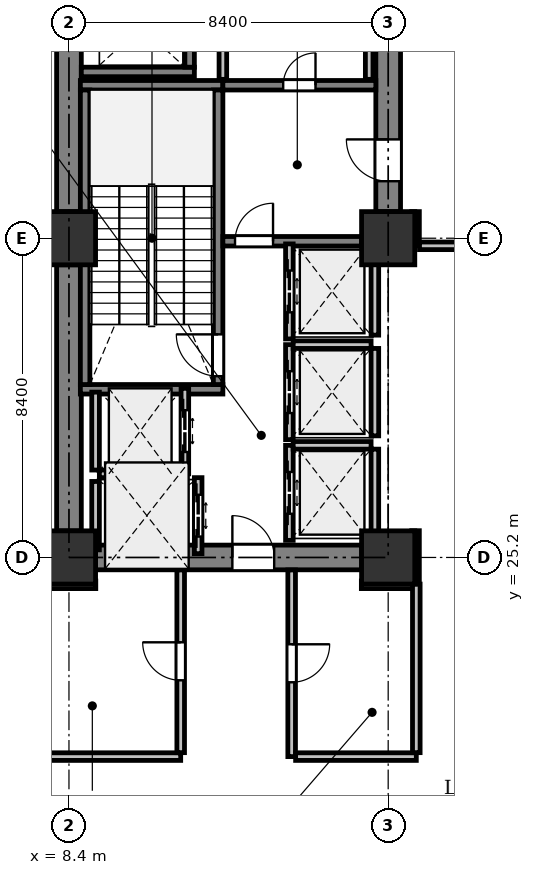
"""IFC4 building model, lengths in metres.
Left out: names, types, materials, properties, quantities, classifications, styles, units other than length and angle.
Written with IfcOpenShell. Run it as: python <this file> out.ifc"""

import sys

from ifc_helpers import new_model, si_unit, direction, frame, frame_2d, origin, origin_2d, place, context, subcontext, project, spatial, rectangle, extrude, element, fill, save


model = new_model("IFC4")
c1 = context("Model", 3, precision=1e-05, world=origin(), true_north=direction((0.0, 1.0)))
c2 = subcontext(c1, "Body", "Model", "MODEL_VIEW")
j1 = project(units=[si_unit("LENGTHUNIT", "METRE"), si_unit("PLANEANGLEUNIT", "RADIAN")], contexts=[c1])
p1 = place(None, origin())
s1 = spatial("IfcSite", under=j1, at=p1, CompositionType="ELEMENT")
p2 = place(p1, origin())
s2 = spatial("IfcBuilding", under=s1, at=p2, CompositionType="ELEMENT")
p3 = place(p2, frame((0.0, 0.0, 79.4)))
s3 = spatial("IfcBuildingStorey", under=s2, at=p3, CompositionType="ELEMENT", Elevation=79.4)
for number, where, z_axis, x_axis in (
    (1, (8.4, 25.2, 0.0), (0.0, 0.0, 1.0), (1.0, 0.0, 0.0)),
    (2, (8.4, 33.6, 0.0), (0.0, 0.0, 1.0), (1.0, 0.0, 0.0)),
    (3, (16.8, 25.2, 0.0), (0.0, 0.0, 1.0), (1.0, 0.0, 0.0)),
    (4, (16.8, 33.6, 0.0), (0.0, 0.0, 1.0), (1.0, 0.0, 0.0)),
):
    element("IfcColumn", number, at=place(p3, frame(where, z_axis=z_axis, x_axis=x_axis)), inside=s3, PredefinedType="COLUMN", context=c2, shape_type="SweptSolid", body=[
        extrude(rectangle(XDim=1.4, YDim=1.4, at=origin_2d()), origin(), (0.0, 0.0, 1.0), 5.0),
    ])
for number, where, z_axis, x_axis in (
    (5, (8.4, 25.9, 0.0), (0.0, 0.0, 1.0), (0.0, 1.0, 0.0)),
    (6, (8.4, 34.3, 0.0), (0.0, 0.0, 1.0), (0.0, 1.0, 0.0)),
):
    element("IfcWall", number, at=place(p3, frame(where, z_axis=z_axis, x_axis=x_axis)), inside=s3, PredefinedType="SHEAR", context=c2, shape_type="SweptSolid", body=[
        extrude(rectangle(XDim=7.0, YDim=0.65, at=frame_2d((3.5, 0.0))), origin(), (0.0, 0.0, 1.0), 4.725),
    ])
p4 = place(p3, frame((16.8, 34.3, 0.0), z_axis=(0.0, 0.0, 1.0), x_axis=(0.0, 1.0, 0.0)))
e7 = element("IfcWall", 7, at=p4, inside=s3, PredefinedType="SHEAR", context=c2, shape_type="SweptSolid", body=[
    extrude(rectangle(XDim=7.0, YDim=0.65, at=frame_2d((3.5, 0.0))), origin(), (0.0, 0.0, 1.0), 4.725),
])
p5 = place(p4, frame((0.8, 0.0, 0.0)))
e8 = element("IfcOpeningElement", 8, at=p5, cuts=e7, PredefinedType="OPENING", context=c2, shape_type="SweptSolid", body=[
    extrude(rectangle(XDim=1.1, YDim=2.15, at=frame_2d((0.55, 1.075))), frame((0.0, 0.335, 0.0), z_axis=(0.0, -1.0, 0.0), x_axis=(1.0, 0.0, 0.0)), (0.0, 0.0, 1.0), 0.67),
])
p6 = place(p3, frame((9.1, 25.2, 0.0), z_axis=(0.0, 0.0, 1.0), x_axis=(1.0, 0.0, 0.0)))
e9 = element("IfcWall", 9, at=p6, inside=s3, PredefinedType="SHEAR", context=c2, shape_type="SweptSolid", body=[
    extrude(rectangle(XDim=7.0, YDim=0.65, at=frame_2d((3.5, 0.0))), origin(), (0.0, 0.0, 1.0), 4.725),
])
p7 = place(p6, frame((3.6, 0.0, 0.0)))
e10 = element("IfcOpeningElement", 10, at=p7, cuts=e9, PredefinedType="OPENING", context=c2, shape_type="SweptSolid", body=[
    extrude(rectangle(XDim=1.1, YDim=2.15, at=frame_2d((0.55, 1.075))), frame((0.0, 0.335, 0.0), z_axis=(0.0, -1.0, 0.0), x_axis=(1.0, 0.0, 0.0)), (0.0, 0.0, 1.0), 0.67),
])
for number, where, z_axis, x_axis in (
    (11, (12.45, 29.625, 0.0), (0.0, 0.0, 1.0), (-1.0, 0.0, 0.0)),
    (12, (12.45, 37.625, 0.0), (0.0, 0.0, 1.0), (-1.0, 0.0, 0.0)),
):
    element("IfcWall", number, at=place(p3, frame(where, z_axis=z_axis, x_axis=x_axis)), inside=s3, PredefinedType="SHEAR", context=c2, shape_type="SweptSolid", body=[
        extrude(rectangle(XDim=3.75, YDim=0.25, at=frame_2d((1.875, 0.0))), origin(), (0.0, 0.0, 1.0), 4.725),
    ])
p8 = place(p3, frame((12.325, 29.75, 0.0), z_axis=(0.0, 0.0, 1.0), x_axis=(0.0, 1.0, 0.0)))
e13 = element("IfcWall", 13, at=p8, inside=s3, PredefinedType="SHEAR", context=c2, shape_type="SweptSolid", body=[
    extrude(rectangle(XDim=7.75, YDim=0.25, at=frame_2d((3.875, 0.0))), origin(), (0.0, 0.0, 1.0), 4.725),
])
p9 = place(p8, frame((0.22, 0.0, 0.0)))
e14 = element("IfcOpeningElement", 14, at=p9, cuts=e13, PredefinedType="OPENING", context=c2, shape_type="SweptSolid", body=[
    extrude(rectangle(XDim=1.1, YDim=2.15, at=frame_2d((0.55, 1.075))), frame((0.0, 0.135, 0.0), z_axis=(0.0, -1.0, 0.0), x_axis=(1.0, 0.0, 0.0)), (0.0, 0.0, 1.0), 0.27),
])
p10 = place(p3, frame((8.825, 29.75, 0.0), z_axis=(0.0, 0.0, 1.0), x_axis=(0.0, 1.0, 0.0)))
e15 = element("IfcWall", 15, at=p10, inside=s3, PredefinedType="SHEAR", context=c2, shape_type="SweptSolid", body=[
    extrude(rectangle(XDim=7.75, YDim=0.25, at=frame_2d((3.875, 0.0))), origin(), (0.0, 0.0, 1.0), 4.725),
])
p11 = place(p3, frame((8.725, 37.975, 0.0), z_axis=(0.0, 0.0, 1.0), x_axis=(1.0, 0.0, 0.0)))
e16 = element("IfcWall", 16, at=p11, inside=s3, PredefinedType="SHEAR", context=c2, shape_type="SweptSolid", body=[
    extrude(rectangle(XDim=2.975, YDim=0.25, at=frame_2d((1.487, 0.0))), origin(), (0.0, 0.0, 1.0), 4.725),
])
p12 = place(p3, frame((11.575, 38.1, 0.0), z_axis=(0.0, 0.0, 1.0), x_axis=(0.0, 1.0, 0.0)))
e17 = element("IfcWall", 17, at=p12, inside=s3, PredefinedType="SHEAR", context=c2, shape_type="SweptSolid", body=[
    extrude(rectangle(XDim=2.45, YDim=0.25, at=frame_2d((1.225, 0.0))), origin(), (0.0, 0.0, 1.0), 4.725),
])
p13 = place(p3, frame((12.45, 33.52, 0.0), z_axis=(0.0, 0.0, 1.0), x_axis=(1.0, 0.0, 0.0)))
e18 = element("IfcWall", 18, at=p13, inside=s3, PredefinedType="SHEAR", context=c2, shape_type="SweptSolid", body=[
    extrude(rectangle(XDim=3.65, YDim=0.25, at=frame_2d((1.825, 0.0))), origin(), (0.0, 0.0, 1.0), 4.725),
])
p14 = place(p13, frame((0.32, 0.0, 0.0)))
e19 = element("IfcOpeningElement", 19, at=p14, cuts=e18, PredefinedType="OPENING", context=c2, shape_type="SweptSolid", body=[
    extrude(rectangle(XDim=1.0, YDim=2.15, at=frame_2d((0.5, 1.075))), frame((0.0, 0.135, 0.0), z_axis=(0.0, -1.0, 0.0), x_axis=(1.0, 0.0, 0.0)), (0.0, 0.0, 1.0), 0.27),
])
p15 = place(p3, frame((12.45, 37.625, 0.0), z_axis=(0.0, 0.0, 1.0), x_axis=(1.0, 0.0, 0.0)))
e20 = element("IfcWall", 20, at=p15, inside=s3, PredefinedType="SHEAR", context=c2, shape_type="SweptSolid", body=[
    extrude(rectangle(XDim=4.025, YDim=0.25, at=frame_2d((2.013, 0.0))), origin(), (0.0, 0.0, 1.0), 4.725),
])
p16 = place(p15, frame((1.587, 0.0, 0.0)))
e21 = element("IfcOpeningElement", 21, at=p16, cuts=e20, PredefinedType="OPENING", context=c2, shape_type="SweptSolid", body=[
    extrude(rectangle(XDim=0.85, YDim=2.15, at=frame_2d((0.425, 1.075))), frame((0.0, 0.135, 0.0), z_axis=(0.0, -1.0, 0.0), x_axis=(1.0, 0.0, 0.0)), (0.0, 0.0, 1.0), 0.27),
])
p17 = place(p3, frame((11.45, 27.4, 0.0), z_axis=(0.0, 0.0, 1.0), x_axis=(0.0, 1.0, 0.0)))
e22 = element("IfcWall", 22, at=p17, inside=s3, PredefinedType="PARTITIONING", context=c2, shape_type="SweptSolid", body=[
    extrude(rectangle(XDim=2.25, YDim=0.2, at=frame_2d((1.125, 0.0))), origin(), (0.0, 0.0, 1.0), 4.725),
])
p18 = place(p17, frame((0.575, 0.0, 0.0)))
e23 = element("IfcOpeningElement", 23, at=p18, cuts=e22, PredefinedType="OPENING", context=c2, shape_type="SweptSolid", body=[
    extrude(rectangle(XDim=1.1, YDim=2.2, at=frame_2d((0.55, 1.1))), frame((0.0, 0.11, 0.0), z_axis=(0.0, -1.0, 0.0), x_axis=(1.0, 0.0, 0.0)), (0.0, 0.0, 1.0), 0.22),
])
p19 = place(p3, frame((9.1, 27.5, 0.0), z_axis=(0.0, 0.0, 1.0), x_axis=(0.0, 1.0, 0.0)))
e24 = element("IfcWall", 24, at=p19, inside=s3, PredefinedType="PARTITIONING", context=c2, shape_type="SweptSolid", body=[
    extrude(rectangle(XDim=2.05, YDim=0.2, at=frame_2d((1.025, 0.0))), origin(), (0.0, 0.0, 1.0), 4.725),
])
p20 = place(p3, frame((9.2, 27.4, 0.0), z_axis=(0.0, 0.0, 1.0), x_axis=(1.0, 0.0, 0.0)))
e25 = element("IfcWall", 25, at=p20, inside=s3, PredefinedType="PARTITIONING", context=c2, shape_type="SweptSolid", body=[
    extrude(rectangle(XDim=2.15, YDim=0.2, at=frame_2d((1.075, 0.0))), origin(), (0.0, 0.0, 1.0), 4.725),
])
p21 = place(p3, frame((11.8, 25.3, 0.0), z_axis=(0.0, 0.0, 1.0), x_axis=(0.0, 1.0, 0.0)))
e26 = element("IfcWall", 26, at=p21, inside=s3, PredefinedType="PARTITIONING", context=c2, shape_type="SweptSolid", body=[
    extrude(rectangle(XDim=2.0, YDim=0.2, at=frame_2d((1.0, 0.0))), origin(), (0.0, 0.0, 1.0), 4.725),
])
p22 = place(p21, frame((0.45, 0.0, 0.0)))
e27 = element("IfcOpeningElement", 27, at=p22, cuts=e26, PredefinedType="OPENING", context=c2, shape_type="SweptSolid", body=[
    extrude(rectangle(XDim=1.1, YDim=2.2, at=frame_2d((0.55, 1.1))), frame((0.0, 0.11, 0.0), z_axis=(0.0, -1.0, 0.0), x_axis=(1.0, 0.0, 0.0)), (0.0, 0.0, 1.0), 0.22),
])
p23 = place(p3, frame((9.1, 25.4, 0.0), z_axis=(0.0, 0.0, 1.0), x_axis=(0.0, 1.0, 0.0)))
e28 = element("IfcWall", 28, at=p23, inside=s3, PredefinedType="PARTITIONING", context=c2, shape_type="SweptSolid", body=[
    extrude(rectangle(XDim=1.8, YDim=0.2, at=frame_2d((0.9, 0.0))), origin(), (0.0, 0.0, 1.0), 4.725),
])
p24 = place(p3, frame((14.2, 25.65, 0.0), z_axis=(0.0, 0.0, 1.0), x_axis=(0.0, 1.0, 0.0)))
e29 = element("IfcWall", 29, at=p24, inside=s3, PredefinedType="PARTITIONING", context=c2, shape_type="SweptSolid", body=[
    extrude(rectangle(XDim=2.5, YDim=0.2, at=frame_2d((1.25, 0.0))), origin(), (0.0, 0.0, 1.0), 4.725),
])
p25 = place(p24, frame((0.7, 0.0, 0.0)))
e30 = element("IfcOpeningElement", 30, at=p25, cuts=e29, PredefinedType="OPENING", context=c2, shape_type="SweptSolid", body=[
    extrude(rectangle(XDim=1.1, YDim=2.2, at=frame_2d((0.55, 1.1))), frame((0.0, 0.11, 0.0), z_axis=(0.0, -1.0, 0.0), x_axis=(1.0, 0.0, 0.0)), (0.0, 0.0, 1.0), 0.22),
])
p26 = place(p3, frame((16.45, 25.75, 0.0), z_axis=(0.0, 0.0, 1.0), x_axis=(0.0, 1.0, 0.0)))
e31 = element("IfcWall", 31, at=p26, inside=s3, PredefinedType="PARTITIONING", context=c2, shape_type="SweptSolid", body=[
    extrude(rectangle(XDim=2.3, YDim=0.2, at=frame_2d((1.15, 0.0))), origin(), (0.0, 0.0, 1.0), 4.725),
])
p27 = place(p3, frame((14.3, 28.15, 0.0), z_axis=(0.0, 0.0, 1.0), x_axis=(1.0, 0.0, 0.0)))
e32 = element("IfcWall", 32, at=p27, inside=s3, PredefinedType="PARTITIONING", context=c2, shape_type="SweptSolid", body=[
    extrude(rectangle(XDim=2.05, YDim=0.2, at=frame_2d((1.025, 0.0))), origin(), (0.0, 0.0, 1.0), 4.725),
])
p28 = place(p3, frame((14.2, 28.3, 0.0), z_axis=(0.0, 0.0, 1.0), x_axis=(0.0, 1.0, 0.0)))
e33 = element("IfcWall", 33, at=p28, inside=s3, PredefinedType="PARTITIONING", context=c2, shape_type="SweptSolid", body=[
    extrude(rectangle(XDim=2.5, YDim=0.2, at=frame_2d((1.25, 0.0))), origin(), (0.0, 0.0, 1.0), 4.725),
])
p29 = place(p28, frame((0.7, 0.0, 0.0)))
e34 = element("IfcOpeningElement", 34, at=p29, cuts=e33, PredefinedType="OPENING", context=c2, shape_type="SweptSolid", body=[
    extrude(rectangle(XDim=1.1, YDim=2.2, at=frame_2d((0.55, 1.1))), frame((0.0, 0.11, 0.0), z_axis=(0.0, -1.0, 0.0), x_axis=(1.0, 0.0, 0.0)), (0.0, 0.0, 1.0), 0.22),
])
p30 = place(p3, frame((16.45, 28.4, 0.0), z_axis=(0.0, 0.0, 1.0), x_axis=(0.0, 1.0, 0.0)))
e35 = element("IfcWall", 35, at=p30, inside=s3, PredefinedType="PARTITIONING", context=c2, shape_type="SweptSolid", body=[
    extrude(rectangle(XDim=2.3, YDim=0.2, at=frame_2d((1.15, 0.0))), origin(), (0.0, 0.0, 1.0), 4.725),
])
p31 = place(p3, frame((14.3, 30.8, 0.0), z_axis=(0.0, 0.0, 1.0), x_axis=(1.0, 0.0, 0.0)))
e36 = element("IfcWall", 36, at=p31, inside=s3, PredefinedType="PARTITIONING", context=c2, shape_type="SweptSolid", body=[
    extrude(rectangle(XDim=2.05, YDim=0.2, at=frame_2d((1.025, 0.0))), origin(), (0.0, 0.0, 1.0), 4.725),
])
p32 = place(p3, frame((14.2, 30.95, 0.0), z_axis=(0.0, 0.0, 1.0), x_axis=(0.0, 1.0, 0.0)))
e37 = element("IfcWall", 37, at=p32, inside=s3, PredefinedType="PARTITIONING", context=c2, shape_type="SweptSolid", body=[
    extrude(rectangle(XDim=2.5, YDim=0.2, at=frame_2d((1.25, 0.0))), origin(), (0.0, 0.0, 1.0), 4.725),
])
p33 = place(p32, frame((0.7, 0.0, 0.0)))
e38 = element("IfcOpeningElement", 38, at=p33, cuts=e37, PredefinedType="OPENING", context=c2, shape_type="SweptSolid", body=[
    extrude(rectangle(XDim=1.1, YDim=2.2, at=frame_2d((0.55, 1.1))), frame((0.0, 0.11, 0.0), z_axis=(0.0, -1.0, 0.0), x_axis=(1.0, 0.0, 0.0)), (0.0, 0.0, 1.0), 0.22),
])
p34 = place(p3, frame((16.45, 31.05, 0.0), z_axis=(0.0, 0.0, 1.0), x_axis=(0.0, 1.0, 0.0)))
e39 = element("IfcWall", 39, at=p34, inside=s3, PredefinedType="PARTITIONING", context=c2, shape_type="SweptSolid", body=[
    extrude(rectangle(XDim=2.3, YDim=0.2, at=frame_2d((1.15, 0.0))), origin(), (0.0, 0.0, 1.0), 4.725),
])
for number, where, z_axis, x_axis in (
    (40, (16.3, 37.78, 0.0), (0.0, 0.0, 1.0), (0.0, 1.0, 0.0)),
    (41, (12.45, 40.546, 0.0), (0.0, 0.0, 1.0), (0.0, -1.0, 0.0)),
):
    element("IfcWall", number, at=place(p3, frame(where, z_axis=z_axis, x_axis=x_axis)), inside=s3, PredefinedType="PARTITIONING", context=c2, shape_type="SweptSolid", body=[
        extrude(rectangle(XDim=2.766, YDim=0.2, at=frame_2d((1.383, 0.0))), origin(), (0.0, 0.0, 1.0), 3.625),
    ])
p35 = place(p3, frame((17.52, 34.3, 0.0), z_axis=(0.0, 0.0, 1.0), x_axis=(0.0, -1.0, 0.0)))
e42 = element("IfcWall", 42, at=p35, inside=s3, PredefinedType="PARTITIONING", context=c2, shape_type="SweptSolid", body=[
    extrude(rectangle(XDim=0.9, YDim=0.2, at=frame_2d((0.45, 0.0))), origin(), (0.0, 0.0, 1.0), 3.825),
])
p36 = place(p3, frame((17.624, 33.4, 0.0), z_axis=(0.0, 0.0, 1.0), x_axis=(1.0, 0.0, 0.0)))
e43 = element("IfcWall", 43, at=p36, inside=s3, PredefinedType="PARTITIONING", context=c2, shape_type="SweptSolid", body=[
    extrude(rectangle(XDim=7.306, YDim=0.2, at=frame_2d((3.653, 0.0))), origin(), (0.0, 0.0, 1.0), 3.825),
])
p37 = place(p3, frame((9.106, 24.481, 0.0), z_axis=(0.0, 0.0, 1.0), x_axis=(-0.999999755233, -0.000699667487, 0.0)))
e44 = element("IfcWall", 44, at=p37, inside=s3, PredefinedType="PARTITIONING", context=c2, shape_type="SweptSolid", body=[
    extrude(rectangle(XDim=1.396, YDim=0.2, at=frame_2d((0.698, 0.0))), origin(), (0.0, 0.0, 1.0), 3.709),
])
p38 = place(p3, frame((7.814, 19.96, 0.0), z_axis=(0.0, 0.0, 1.0), x_axis=(1.0, 0.0, 0.0)))
e45 = element("IfcWall", 45, at=p38, inside=s3, PredefinedType="PARTITIONING", context=c2, shape_type="SweptSolid", body=[
    extrude(rectangle(XDim=3.526, YDim=0.2, at=frame_2d((1.763, 0.0))), origin(), (0.0, 0.0, 1.0), 3.709),
])
p39 = place(p3, frame((11.34, 20.064, 0.0), z_axis=(0.0, 0.0, 1.0), x_axis=(0.0, 1.0, 0.0)))
e46 = element("IfcWall", 46, at=p39, inside=s3, PredefinedType="PARTITIONING", context=c2, shape_type="SweptSolid", body=[
    extrude(rectangle(XDim=4.807, YDim=0.2, at=frame_2d((2.404, 0.0))), origin(), (0.0, 0.0, 1.0), 4.725),
])
p40 = place(p39, frame((1.904, 0.0, 0.0)))
e47 = element("IfcOpeningElement", 47, at=p40, cuts=e46, PredefinedType="OPENING", context=c2, shape_type="SweptSolid", body=[
    extrude(rectangle(XDim=1.0, YDim=2.15, at=frame_2d((0.5, 1.075))), frame((0.0, 0.11, 0.0), z_axis=(0.0, -1.0, 0.0), x_axis=(1.0, 0.0, 0.0)), (0.0, 0.0, 1.0), 0.22),
])
p41 = place(p3, frame((17.52, 25.904, 0.0), z_axis=(0.0, 0.0, 1.0), x_axis=(0.000347826066, -0.999999939509, 0.0)))
e48 = element("IfcWall", 48, at=p41, inside=s3, PredefinedType="PARTITIONING", context=c2, shape_type="SweptSolid", body=[
    extrude(rectangle(XDim=1.404, YDim=0.2, at=frame_2d((0.702, 0.0))), origin(), (0.0, 0.0, 1.0), 3.825),
])
p42 = place(p3, frame((17.5, 24.48, 0.0), z_axis=(0.0, 0.0, 1.0), x_axis=(-0.999999758706, 0.000694685487, 0.0)))
e49 = element("IfcWall", 49, at=p42, inside=s3, PredefinedType="PARTITIONING", context=c2, shape_type="SweptSolid", body=[
    extrude(rectangle(XDim=1.406, YDim=0.2, at=frame_2d((0.703, 0.0))), origin(), (0.0, 0.0, 1.0), 3.709),
])
p43 = place(p3, frame((14.26, 24.871, 0.0), z_axis=(0.0, 0.0, 1.0), x_axis=(0.0, -1.0, 0.0)))
e50 = element("IfcWall", 50, at=p43, inside=s3, PredefinedType="PARTITIONING", context=c2, shape_type="SweptSolid", body=[
    extrude(rectangle(XDim=4.911, YDim=0.2, at=frame_2d((2.456, 0.0))), origin(), (0.0, 0.0, 1.0), 4.725),
])
p44 = place(p43, frame((1.956, 0.0, 0.0)))
e51 = element("IfcOpeningElement", 51, at=p44, cuts=e50, PredefinedType="OPENING", context=c2, shape_type="SweptSolid", body=[
    extrude(rectangle(XDim=1.0, YDim=2.15, at=frame_2d((0.5, 1.075))), frame((0.0, 0.11, 0.0), z_axis=(0.0, -1.0, 0.0), x_axis=(1.0, 0.0, 0.0)), (0.0, 0.0, 1.0), 0.22),
])
p45 = place(p3, frame((14.364, 19.96, 0.0), z_axis=(0.0, 0.0, 1.0), x_axis=(1.0, 0.0, 0.0)))
e52 = element("IfcWall", 52, at=p45, inside=s3, PredefinedType="PARTITIONING", context=c2, shape_type="SweptSolid", body=[
    extrude(rectangle(XDim=3.176, YDim=0.2, at=frame_2d((1.588, 0.0))), origin(), (0.0, 0.0, 1.0), 3.709),
])
p46 = place(p3, frame((17.54, 20.064, 0.0), z_axis=(0.0, 0.0, 1.0), x_axis=(0.0, 1.0, 0.0)))
e53 = element("IfcWall", 53, at=p46, inside=s3, PredefinedType="PARTITIONING", context=c2, shape_type="SweptSolid", body=[
    extrude(rectangle(XDim=4.436, YDim=0.2, at=frame_2d((2.218, 0.0))), origin(), (0.0, 0.0, 1.0), 4.725),
])
p47 = place(p5, origin())
e54 = element("IfcDoor", 54, at=p47, inside=s3, OperationType="SINGLE_SWING_RIGHT", PredefinedType="DOOR", context=c2, shape_type="SweptSolid", body=[
    extrude(rectangle(XDim=1.1, YDim=2.15, at=frame_2d((0.55, 1.075))), frame((0.0, 0.025, 0.0), z_axis=(0.0, -1.0, 0.0), x_axis=(1.0, 0.0, 0.0)), (0.0, 0.0, 1.0), 0.05),
])
fill(e8, e54)
p48 = place(p7, origin())
e55 = element("IfcDoor", 55, at=p48, inside=s3, OperationType="SINGLE_SWING_LEFT", PredefinedType="DOOR", context=c2, shape_type="SweptSolid", body=[
    extrude(rectangle(XDim=1.1, YDim=2.15, at=frame_2d((0.55, 1.075))), frame((0.0, 0.025, 0.0), z_axis=(0.0, -1.0, 0.0), x_axis=(1.0, 0.0, 0.0)), (0.0, 0.0, 1.0), 0.05),
])
fill(e10, e55)
p49 = place(p9, origin())
e56 = element("IfcDoor", 56, at=p49, inside=s3, OperationType="SINGLE_SWING_RIGHT", PredefinedType="DOOR", context=c2, shape_type="SweptSolid", body=[
    extrude(rectangle(XDim=1.1, YDim=2.15, at=frame_2d((0.55, 1.075))), frame((0.0, 0.025, 0.0), z_axis=(0.0, -1.0, 0.0), x_axis=(1.0, 0.0, 0.0)), (0.0, 0.0, 1.0), 0.05),
])
fill(e14, e56)
p50 = place(p14, origin())
e57 = element("IfcDoor", 57, at=p50, inside=s3, OperationType="SINGLE_SWING_RIGHT", PredefinedType="DOOR", context=c2, shape_type="SweptSolid", body=[
    extrude(rectangle(XDim=1.0, YDim=2.15, at=frame_2d((0.5, 1.075))), frame((0.0, 0.025, 0.0), z_axis=(0.0, -1.0, 0.0), x_axis=(1.0, 0.0, 0.0)), (0.0, 0.0, 1.0), 0.05),
])
fill(e19, e57)
p51 = place(p18, origin())
e58 = element("IfcDoor", 58, at=p51, inside=s3, OperationType="DOUBLE_DOOR_SLIDING", PredefinedType="DOOR", context=c2, shape_type="SweptSolid", body=[
    extrude(rectangle(XDim=1.1, YDim=2.2, at=frame_2d((0.55, 1.1))), frame((0.0, 0.025, 0.0), z_axis=(0.0, -1.0, 0.0), x_axis=(1.0, 0.0, 0.0)), (0.0, 0.0, 1.0), 0.05),
])
fill(e23, e58)
p52 = place(p22, origin())
e59 = element("IfcDoor", 59, at=p52, inside=s3, OperationType="DOUBLE_DOOR_SLIDING", PredefinedType="DOOR", context=c2, shape_type="SweptSolid", body=[
    extrude(rectangle(XDim=1.1, YDim=2.2, at=frame_2d((0.55, 1.1))), frame((0.0, 0.025, 0.0), z_axis=(0.0, -1.0, 0.0), x_axis=(1.0, 0.0, 0.0)), (0.0, 0.0, 1.0), 0.05),
])
fill(e27, e59)
p53 = place(p25, origin())
e60 = element("IfcDoor", 60, at=p53, inside=s3, OperationType="DOUBLE_DOOR_SLIDING", PredefinedType="DOOR", context=c2, shape_type="SweptSolid", body=[
    extrude(rectangle(XDim=1.1, YDim=2.2, at=frame_2d((0.55, 1.1))), frame((0.0, 0.025, 0.0), z_axis=(0.0, -1.0, 0.0), x_axis=(1.0, 0.0, 0.0)), (0.0, 0.0, 1.0), 0.05),
])
fill(e30, e60)
p54 = place(p29, origin())
e61 = element("IfcDoor", 61, at=p54, inside=s3, OperationType="DOUBLE_DOOR_SLIDING", PredefinedType="DOOR", context=c2, shape_type="SweptSolid", body=[
    extrude(rectangle(XDim=1.1, YDim=2.2, at=frame_2d((0.55, 1.1))), frame((0.0, 0.025, 0.0), z_axis=(0.0, -1.0, 0.0), x_axis=(1.0, 0.0, 0.0)), (0.0, 0.0, 1.0), 0.05),
])
fill(e34, e61)
p55 = place(p33, origin())
e62 = element("IfcDoor", 62, at=p55, inside=s3, OperationType="DOUBLE_DOOR_SLIDING", PredefinedType="DOOR", context=c2, shape_type="SweptSolid", body=[
    extrude(rectangle(XDim=1.1, YDim=2.2, at=frame_2d((0.55, 1.1))), frame((0.0, 0.025, 0.0), z_axis=(0.0, -1.0, 0.0), x_axis=(1.0, 0.0, 0.0)), (0.0, 0.0, 1.0), 0.05),
])
fill(e38, e62)
p56 = place(p16, origin())
e63 = element("IfcDoor", 63, at=p56, inside=s3, OperationType="SINGLE_SWING_RIGHT", PredefinedType="DOOR", context=c2, shape_type="SweptSolid", body=[
    extrude(rectangle(XDim=0.85, YDim=2.15, at=frame_2d((0.425, 1.075))), frame((0.0, 0.025, 0.0), z_axis=(0.0, -1.0, 0.0), x_axis=(1.0, 0.0, 0.0)), (0.0, 0.0, 1.0), 0.05),
])
fill(e21, e63)
p57 = place(p40, origin())
e64 = element("IfcDoor", 64, at=p57, inside=s3, OperationType="SINGLE_SWING_RIGHT", PredefinedType="DOOR", context=c2, shape_type="SweptSolid", body=[
    extrude(rectangle(XDim=1.0, YDim=2.15, at=frame_2d((0.5, 1.075))), frame((0.0, 0.025, 0.0), z_axis=(0.0, -1.0, 0.0), x_axis=(1.0, 0.0, 0.0)), (0.0, 0.0, 1.0), 0.05),
])
fill(e47, e64)
p58 = place(p44, origin())
e65 = element("IfcDoor", 65, at=p58, inside=s3, OperationType="SINGLE_SWING_LEFT", PredefinedType="DOOR", context=c2, shape_type="SweptSolid", body=[
    extrude(rectangle(XDim=1.0, YDim=2.15, at=frame_2d((0.5, 1.075))), frame((0.0, 0.025, 0.0), z_axis=(0.0, -1.0, 0.0), x_axis=(1.0, 0.0, 0.0)), (0.0, 0.0, 1.0), 0.05),
])
fill(e51, e65)
save(model, sys.argv[1])
